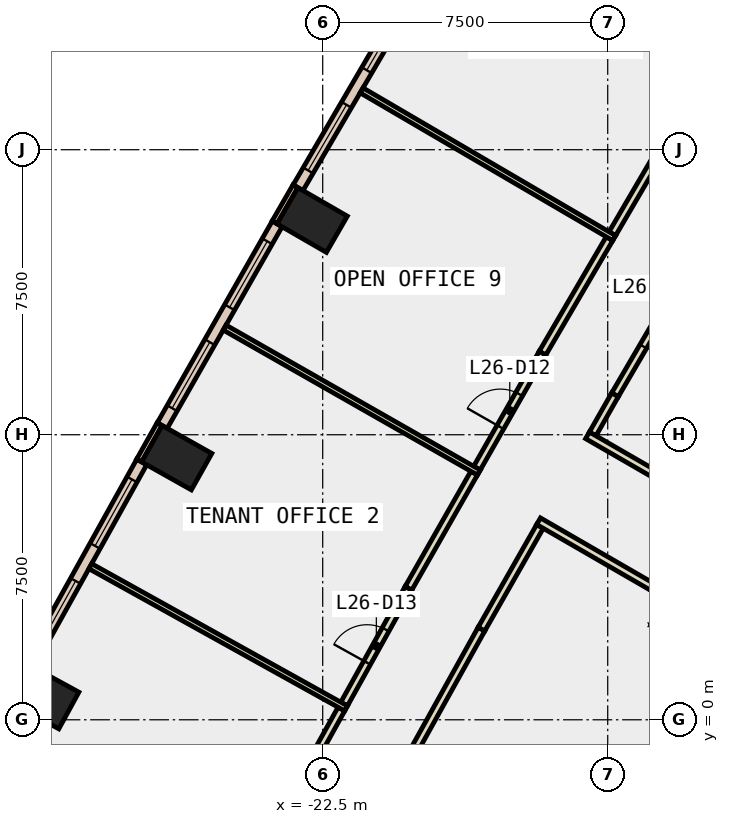
"""IFC4 building model, lengths in metres.
Left out: names, types, materials, properties, quantities, classifications, styles, units other than length and angle.
Written with IfcOpenShell. Run it as: python <this file> out.ifc"""

import sys

from ifc_helpers import new_model, si_unit, direction, frame, frame_2d, origin, origin_2d, place, context, subcontext, project, spatial, rectangle, extrude, element, fill, save


model = new_model("IFC4")
c1 = context("Model", 3, precision=1e-05, world=origin(), true_north=direction((0.0, 1.0)))
c2 = subcontext(c1, "Body", "Model", "MODEL_VIEW")
j1 = project(units=[si_unit("LENGTHUNIT", "METRE"), si_unit("PLANEANGLEUNIT", "RADIAN")], contexts=[c1])
p1 = place(None, origin())
s1 = spatial("IfcSite", under=j1, at=p1, CompositionType="ELEMENT")
p2 = place(p1, origin())
s2 = spatial("IfcBuilding", under=s1, at=p2, CompositionType="ELEMENT")
p3 = place(p2, frame((0.0, 0.0, 120.2)))
s3 = spatial("IfcBuildingStorey", under=s2, at=p3, CompositionType="ELEMENT", Elevation=120.2)
for number, where, z_axis, x_axis in (
    (1, (-22.777, 13.15, -0.4), (0.0, 0.0, 1.0), (0.5, 0.866, 0.0)),
    (2, (-26.341, 6.896, -0.4), (0.0, 0.0, 1.0), (0.49, 0.872, 0.0)),
    (3, (-29.838, 0.604, -0.4), (0.0, 0.0, 1.0), (0.48, 0.877, 0.0)),
):
    element("IfcColumn", number, at=place(p3, frame(where, z_axis=z_axis, x_axis=x_axis)), inside=s3, PredefinedType="COLUMN", context=c2, shape_type="SweptSolid", body=[
        extrude(rectangle(XDim=1.1, YDim=1.5, at=origin_2d()), origin(), (0.0, 0.0, 1.0), 4.2),
    ])
p4 = place(p3, frame((-23.216, 14.039, 0.0), z_axis=(0.0, 0.0, 1.0), x_axis=(-0.499837685251, -0.86611909597, 0.0)))
e4 = element("IfcWall", 4, at=p4, inside=s3, PredefinedType="STANDARD", context=c2, shape_type="SweptSolid", body=[
    extrude(rectangle(XDim=1.1, YDim=0.15, at=frame_2d((0.55, 0.0))), origin(), (0.0, 0.0, 1.0), 3.8),
])
p5 = place(p3, frame((-26.791, 7.78, 0.0), z_axis=(0.0, 0.0, 1.0), x_axis=(-0.490008344094, -0.871717742574, 0.0)))
e5 = element("IfcWall", 5, at=p5, inside=s3, PredefinedType="STANDARD", context=c2, shape_type="SweptSolid", body=[
    extrude(rectangle(XDim=1.1, YDim=0.15, at=frame_2d((0.55, 0.0))), origin(), (0.0, 0.0, 1.0), 3.8),
])
p6 = place(p3, frame((-20.065, 19.273, 0.0), z_axis=(0.0, 0.0, 1.0), x_axis=(-0.504790055126, -0.863242144619, 0.0)))
e6 = element("IfcWall", 6, at=p6, inside=s3, PredefinedType="STANDARD", context=c2, shape_type="SweptSolid", body=[
    extrude(rectangle(XDim=6.109, YDim=0.3, at=frame_2d((3.055, 0.0))), origin(), (0.0, 0.0, 1.0), 3.8),
])
p7 = place(p6, frame((0.527, 0.0, 0.9)))
e7 = element("IfcOpeningElement", 7, at=p7, cuts=e6, PredefinedType="OPENING", context=c2, shape_type="SweptSolid", body=[
    extrude(rectangle(XDim=2.0, YDim=2.6, at=frame_2d((1.0, 1.3))), frame((0.0, 0.16, 0.0), z_axis=(0.0, -1.0, 0.0), x_axis=(1.0, 0.0, 0.0)), (0.0, 0.0, 1.0), 0.32),
])
p8 = place(p6, frame((3.582, 0.0, 0.9)))
e8 = element("IfcOpeningElement", 8, at=p8, cuts=e6, PredefinedType="OPENING", context=c2, shape_type="SweptSolid", body=[
    extrude(rectangle(XDim=2.0, YDim=2.6, at=frame_2d((1.0, 1.3))), frame((0.0, 0.16, 0.0), z_axis=(0.0, -1.0, 0.0), x_axis=(1.0, 0.0, 0.0)), (0.0, 0.0, 1.0), 0.32),
])
p9 = place(p3, frame((-23.698, 13.048, 0.0), z_axis=(0.0, 0.0, 1.0), x_axis=(-0.495114366991, -0.868827810098, 0.0)))
e9 = element("IfcWall", 9, at=p9, inside=s3, PredefinedType="STANDARD", context=c2, shape_type="SweptSolid", body=[
    extrude(rectangle(XDim=6.11, YDim=0.3, at=frame_2d((3.055, 0.0))), origin(), (0.0, 0.0, 1.0), 3.8),
])
p10 = place(p9, frame((0.527, 0.0, 0.9)))
e10 = element("IfcOpeningElement", 10, at=p10, cuts=e9, PredefinedType="OPENING", context=c2, shape_type="SweptSolid", body=[
    extrude(rectangle(XDim=2.0, YDim=2.6, at=frame_2d((1.0, 1.3))), frame((0.0, 0.16, 0.0), z_axis=(0.0, -1.0, 0.0), x_axis=(1.0, 0.0, 0.0)), (0.0, 0.0, 1.0), 0.32),
])
p11 = place(p9, frame((3.582, 0.0, 0.9)))
e11 = element("IfcOpeningElement", 11, at=p11, cuts=e9, PredefinedType="OPENING", context=c2, shape_type="SweptSolid", body=[
    extrude(rectangle(XDim=2.0, YDim=2.6, at=frame_2d((1.0, 1.3))), frame((0.0, 0.16, 0.0), z_axis=(0.0, -1.0, 0.0), x_axis=(1.0, 0.0, 0.0)), (0.0, 0.0, 1.0), 0.32),
])
p12 = place(p3, frame((-27.262, 6.784, 0.0), z_axis=(0.0, 0.0, 1.0), x_axis=(-0.485822751649, -0.874057351654, 0.0)))
e12 = element("IfcWall", 12, at=p12, inside=s3, PredefinedType="STANDARD", context=c2, shape_type="SweptSolid", body=[
    extrude(rectangle(XDim=6.109, YDim=0.3, at=frame_2d((3.055, 0.0))), origin(), (0.0, 0.0, 1.0), 3.8),
])
p13 = place(p12, frame((0.527, 0.0, 0.9)))
e13 = element("IfcOpeningElement", 13, at=p13, cuts=e12, PredefinedType="OPENING", context=c2, shape_type="SweptSolid", body=[
    extrude(rectangle(XDim=2.0, YDim=2.6, at=frame_2d((1.0, 1.3))), frame((0.0, 0.16, 0.0), z_axis=(0.0, -1.0, 0.0), x_axis=(1.0, 0.0, 0.0)), (0.0, 0.0, 1.0), 0.32),
])
p14 = place(p12, frame((3.582, 0.0, 0.9)))
e14 = element("IfcOpeningElement", 14, at=p14, cuts=e12, PredefinedType="OPENING", context=c2, shape_type="SweptSolid", body=[
    extrude(rectangle(XDim=2.0, YDim=2.6, at=frame_2d((1.0, 1.3))), frame((0.0, 0.16, 0.0), z_axis=(0.0, -1.0, 0.0), x_axis=(1.0, 0.0, 0.0)), (0.0, 0.0, 1.0), 0.32),
])
p15 = place(p3, frame((-12.815, 11.96, 0.0), z_axis=(0.0, 0.0, 1.0), x_axis=(-0.5048198861, -0.863224699946, 0.0)))
e15 = element("IfcWall", 15, at=p15, inside=s3, PredefinedType="PARTITIONING", context=c2, shape_type="SweptSolid", body=[
    extrude(rectangle(XDim=3.95, YDim=0.2, at=frame_2d((1.975, 0.0))), origin(), (0.0, 0.0, 1.0), 3.8),
])
p16 = place(p15, frame((1.475, 0.0, 0.0)))
e16 = element("IfcOpeningElement", 16, at=p16, cuts=e15, PredefinedType="OPENING", context=c2, shape_type="SweptSolid", body=[
    extrude(rectangle(XDim=1.0, YDim=2.1, at=frame_2d((0.5, 1.05))), frame((0.0, 0.11, 0.0), z_axis=(0.0, -1.0, 0.0), x_axis=(1.0, 0.0, 0.0)), (0.0, 0.0, 1.0), 0.22),
])
p17 = place(p3, frame((-14.809, 8.55, 0.0), z_axis=(0.0, 0.0, 1.0), x_axis=(-0.495074026382, -0.868850797549, 0.0)))
e17 = element("IfcWall", 17, at=p17, inside=s3, PredefinedType="PARTITIONING", context=c2, shape_type="SweptSolid", body=[
    extrude(rectangle(XDim=1.186, YDim=0.2, at=frame_2d((0.593, 0.0))), origin(), (0.0, 0.0, 1.0), 3.8),
])
p18 = place(p3, frame((-15.532, 7.484, 0.0), z_axis=(0.0, 0.0, 1.0), x_axis=(0.866045954906, -0.499964402723, 0.0)))
e18 = element("IfcWall", 18, at=p18, inside=s3, PredefinedType="PARTITIONING", context=c2, shape_type="SweptSolid", body=[
    extrude(rectangle(XDim=3.494, YDim=0.2, at=frame_2d((1.747, 0.0))), origin(), (0.0, 0.0, 1.0), 3.8),
])
p19 = place(p3, frame((-16.783, 5.088, 0.0), z_axis=(0.0, 0.0, 1.0), x_axis=(-0.495023676383, -0.868879485211, 0.0)))
e19 = element("IfcWall", 19, at=p19, inside=s3, PredefinedType="PARTITIONING", context=c2, shape_type="SweptSolid", body=[
    extrude(rectangle(XDim=3.113, YDim=0.2, at=frame_2d((1.557, 0.0))), origin(), (0.0, 0.0, 1.0), 3.8),
])
p20 = place(p3, frame((-18.324, 2.383, 0.0), z_axis=(0.0, 0.0, 1.0), x_axis=(-0.485826874234, -0.874055060206, 0.0)))
e20 = element("IfcWall", 20, at=p20, inside=s3, PredefinedType="PARTITIONING", context=c2, shape_type="SweptSolid", body=[
    extrude(rectangle(XDim=7.099, YDim=0.2, at=frame_2d((3.55, 0.0))), origin(), (0.0, 0.0, 1.0), 3.8),
])
p21 = place(p3, frame((-14.879, 12.789, 0.0), z_axis=(0.0, 0.0, 1.0), x_axis=(0.504763220102, 0.863257836126, 0.0)))
e21 = element("IfcWall", 21, at=p21, inside=s3, PredefinedType="PARTITIONING", context=c2, shape_type="SweptSolid", body=[
    extrude(rectangle(XDim=3.487, YDim=0.2, at=frame_2d((1.743, 0.0))), origin(), (0.0, 0.0, 1.0), 3.8),
])
p22 = place(p3, frame((-18.441, 6.621, 0.0), z_axis=(0.0, 0.0, 1.0), x_axis=(0.495286549488, 0.868729666753, 0.0)))
e22 = element("IfcWall", 22, at=p22, inside=s3, PredefinedType="PARTITIONING", context=c2, shape_type="SweptSolid", body=[
    extrude(rectangle(XDim=3.487, YDim=0.2, at=frame_2d((1.743, 0.0))), origin(), (0.0, 0.0, 1.0), 3.8),
])
p23 = place(p22, frame((1.243, 0.0, 0.0)))
e23 = element("IfcOpeningElement", 23, at=p23, cuts=e22, PredefinedType="OPENING", context=c2, shape_type="SweptSolid", body=[
    extrude(rectangle(XDim=1.0, YDim=2.1, at=frame_2d((0.5, 1.05))), frame((0.0, 0.11, 0.0), z_axis=(0.0, -1.0, 0.0), x_axis=(1.0, 0.0, 0.0)), (0.0, 0.0, 1.0), 0.22),
])
p24 = place(p3, frame((-16.714, 9.65, 0.0), z_axis=(0.0, 0.0, 1.0), x_axis=(0.504885284202, 0.863186451351, 0.0)))
e24 = element("IfcWall", 24, at=p24, inside=s3, PredefinedType="PARTITIONING", context=c2, shape_type="SweptSolid", body=[
    extrude(rectangle(XDim=3.486, YDim=0.2, at=frame_2d((1.743, 0.0))), origin(), (0.0, 0.0, 1.0), 3.8),
])
p25 = place(p3, frame((-21.936, 0.414, 0.0), z_axis=(0.0, 0.0, 1.0), x_axis=(0.485827202541, 0.874054877723, 0.0)))
e25 = element("IfcWall", 25, at=p25, inside=s3, PredefinedType="PARTITIONING", context=c2, shape_type="SweptSolid", body=[
    extrude(rectangle(XDim=3.487, YDim=0.2, at=frame_2d((1.744, 0.0))), origin(), (0.0, 0.0, 1.0), 3.8),
])
p26 = place(p25, frame((1.244, 0.0, 0.0)))
e26 = element("IfcOpeningElement", 26, at=p26, cuts=e25, PredefinedType="OPENING", context=c2, shape_type="SweptSolid", body=[
    extrude(rectangle(XDim=1.0, YDim=2.1, at=frame_2d((0.5, 1.05))), frame((0.0, 0.11, 0.0), z_axis=(0.0, -1.0, 0.0), x_axis=(1.0, 0.0, 0.0)), (0.0, 0.0, 1.0), 0.22),
])
p27 = place(p3, frame((-20.242, 3.462, 0.0), z_axis=(0.0, 0.0, 1.0), x_axis=(0.495309264725, 0.868716715781, 0.0)))
e27 = element("IfcWall", 27, at=p27, inside=s3, PredefinedType="PARTITIONING", context=c2, shape_type="SweptSolid", body=[
    extrude(rectangle(XDim=3.487, YDim=0.2, at=frame_2d((1.743, 0.0))), origin(), (0.0, 0.0, 1.0), 3.8),
])
p28 = place(p3, frame((-23.702, -2.764, 0.0), z_axis=(0.0, 0.0, 1.0), x_axis=(0.485892653581, 0.874018494767, 0.0)))
e28 = element("IfcWall", 28, at=p28, inside=s3, PredefinedType="PARTITIONING", context=c2, shape_type="SweptSolid", body=[
    extrude(rectangle(XDim=3.486, YDim=0.2, at=frame_2d((1.743, 0.0))), origin(), (0.0, 0.0, 1.0), 3.8),
])
p29 = place(p3, frame((-14.83, 12.674, 0.0), z_axis=(0.0, 0.0, 1.0), x_axis=(-0.863237916953, 0.504797284794, 0.0)))
e29 = element("IfcWall", 29, at=p29, inside=s3, PredefinedType="PARTITIONING", context=c2, shape_type="SweptSolid", body=[
    extrude(rectangle(XDim=7.7, YDim=0.15, at=frame_2d((3.85, 0.0))), origin(), (0.0, 0.0, 1.0), 3.8),
])
p30 = place(p3, frame((-18.391, 6.506, 0.0), z_axis=(0.0, 0.0, 1.0), x_axis=(-0.868738258528, 0.495271479261, 0.0)))
e30 = element("IfcWall", 30, at=p30, inside=s3, PredefinedType="PARTITIONING", context=c2, shape_type="SweptSolid", body=[
    extrude(rectangle(XDim=7.701, YDim=0.15, at=frame_2d((3.85, 0.0))), origin(), (0.0, 0.0, 1.0), 3.8),
])
p31 = place(p3, frame((-21.885, 0.3, 0.0), z_axis=(0.0, 0.0, 1.0), x_axis=(-0.874095944746, 0.485753311237, 0.0)))
e31 = element("IfcWall", 31, at=p31, inside=s3, PredefinedType="PARTITIONING", context=c2, shape_type="SweptSolid", body=[
    extrude(rectangle(XDim=7.699, YDim=0.15, at=frame_2d((3.85, 0.0))), origin(), (0.0, 0.0, 1.0), 3.8),
])
p32 = place(p3, frame((-13.807, 3.485, 0.0), z_axis=(0.0, 0.0, 1.0), x_axis=(-0.865984597717, 0.500070671522, 0.0)))
e32 = element("IfcWall", 32, at=p32, inside=s3, PredefinedType="PARTITIONING", context=c2, shape_type="SweptSolid", body=[
    extrude(rectangle(XDim=3.479, YDim=0.2, at=frame_2d((1.74, 0.0))), origin(), (0.0, 0.0, 1.0), 3.8),
])
p33 = place(p7, origin())
e33 = element("IfcWindow", 33, at=p33, inside=s3, PartitioningType="SINGLE_PANEL", PredefinedType="WINDOW", context=c2, shape_type="SweptSolid", body=[
    extrude(rectangle(XDim=2.0, YDim=2.6, at=frame_2d((1.0, 1.3))), frame((0.0, 0.03, 0.0), z_axis=(0.0, -1.0, 0.0), x_axis=(1.0, 0.0, 0.0)), (0.0, 0.0, 1.0), 0.06),
])
fill(e7, e33)
p34 = place(p8, origin())
e34 = element("IfcWindow", 34, at=p34, inside=s3, PartitioningType="SINGLE_PANEL", PredefinedType="WINDOW", context=c2, shape_type="SweptSolid", body=[
    extrude(rectangle(XDim=2.0, YDim=2.6, at=frame_2d((1.0, 1.3))), frame((0.0, 0.03, 0.0), z_axis=(0.0, -1.0, 0.0), x_axis=(1.0, 0.0, 0.0)), (0.0, 0.0, 1.0), 0.06),
])
fill(e8, e34)
p35 = place(p10, origin())
e35 = element("IfcWindow", 35, at=p35, inside=s3, PartitioningType="SINGLE_PANEL", PredefinedType="WINDOW", context=c2, shape_type="SweptSolid", body=[
    extrude(rectangle(XDim=2.0, YDim=2.6, at=frame_2d((1.0, 1.3))), frame((0.0, 0.03, 0.0), z_axis=(0.0, -1.0, 0.0), x_axis=(1.0, 0.0, 0.0)), (0.0, 0.0, 1.0), 0.06),
])
fill(e10, e35)
p36 = place(p11, origin())
e36 = element("IfcWindow", 36, at=p36, inside=s3, PartitioningType="SINGLE_PANEL", PredefinedType="WINDOW", context=c2, shape_type="SweptSolid", body=[
    extrude(rectangle(XDim=2.0, YDim=2.6, at=frame_2d((1.0, 1.3))), frame((0.0, 0.03, 0.0), z_axis=(0.0, -1.0, 0.0), x_axis=(1.0, 0.0, 0.0)), (0.0, 0.0, 1.0), 0.06),
])
fill(e11, e36)
p37 = place(p13, origin())
e37 = element("IfcWindow", 37, at=p37, inside=s3, PartitioningType="SINGLE_PANEL", PredefinedType="WINDOW", context=c2, shape_type="SweptSolid", body=[
    extrude(rectangle(XDim=2.0, YDim=2.6, at=frame_2d((1.0, 1.3))), frame((0.0, 0.03, 0.0), z_axis=(0.0, -1.0, 0.0), x_axis=(1.0, 0.0, 0.0)), (0.0, 0.0, 1.0), 0.06),
])
fill(e13, e37)
p38 = place(p14, origin())
e38 = element("IfcWindow", 38, at=p38, inside=s3, PartitioningType="SINGLE_PANEL", PredefinedType="WINDOW", context=c2, shape_type="SweptSolid", body=[
    extrude(rectangle(XDim=2.0, YDim=2.6, at=frame_2d((1.0, 1.3))), frame((0.0, 0.03, 0.0), z_axis=(0.0, -1.0, 0.0), x_axis=(1.0, 0.0, 0.0)), (0.0, 0.0, 1.0), 0.06),
])
fill(e14, e38)
p39 = place(p23, origin())
e39 = element("IfcDoor", 39, at=p39, inside=s3, OperationType="SINGLE_SWING_RIGHT", PredefinedType="DOOR", context=c2, shape_type="SweptSolid", body=[
    extrude(rectangle(XDim=1.0, YDim=2.1, at=frame_2d((0.5, 1.05))), frame((0.0, 0.025, 0.0), z_axis=(0.0, -1.0, 0.0), x_axis=(1.0, 0.0, 0.0)), (0.0, 0.0, 1.0), 0.05),
])
fill(e23, e39)
p40 = place(p26, origin())
e40 = element("IfcDoor", 40, at=p40, inside=s3, OperationType="SINGLE_SWING_RIGHT", PredefinedType="DOOR", context=c2, shape_type="SweptSolid", body=[
    extrude(rectangle(XDim=1.0, YDim=2.1, at=frame_2d((0.5, 1.05))), frame((0.0, 0.025, 0.0), z_axis=(0.0, -1.0, 0.0), x_axis=(1.0, 0.0, 0.0)), (0.0, 0.0, 1.0), 0.05),
])
fill(e26, e40)
p41 = place(p16, origin())
e41 = element("IfcDoor", 41, at=p41, inside=s3, OperationType="SINGLE_SWING_RIGHT", PredefinedType="DOOR", context=c2, shape_type="SweptSolid", body=[
    extrude(rectangle(XDim=1.0, YDim=2.1, at=frame_2d((0.5, 1.05))), frame((0.0, 0.025, 0.0), z_axis=(0.0, -1.0, 0.0), x_axis=(1.0, 0.0, 0.0)), (0.0, 0.0, 1.0), 0.05),
])
fill(e16, e41)
save(model, sys.argv[1])
